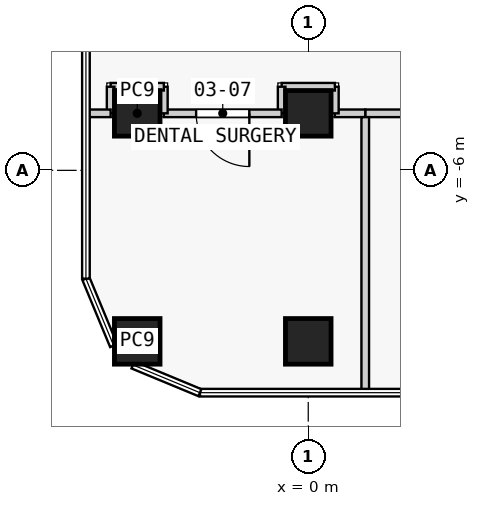
"""IFC4 building model, lengths in metres.
Left out: names, types, materials, properties, quantities, classifications, styles, units other than length and angle.
Written with IfcOpenShell. Run it as: python <this file> out.ifc"""

import sys

from ifc_helpers import new_model, si_unit, direction, frame, frame_2d, origin, origin_2d, place, context, subcontext, project, spatial, rectangle, extrude, element, fill, save


model = new_model("IFC4")
c1 = context("Model", 3, precision=1e-05, world=origin(), true_north=direction((0.0, 1.0)))
c2 = subcontext(c1, "Body", "Model", "MODEL_VIEW")
j1 = project(units=[si_unit("LENGTHUNIT", "METRE"), si_unit("PLANEANGLEUNIT", "RADIAN")], contexts=[c1])
p1 = place(None, origin())
s1 = spatial("IfcSite", under=j1, at=p1, CompositionType="ELEMENT")
p2 = place(p1, origin())
s2 = spatial("IfcBuilding", under=s1, at=p2, CompositionType="ELEMENT")
p3 = place(p2, frame((0.0, 0.0, 17.3)))
s3 = spatial("IfcBuildingStorey", under=s2, at=p3, CompositionType="ELEMENT", Elevation=17.3)
for number, where, z_axis, x_axis in (
    (1, (-4.5, -10.5, 0.0), (0.0, 0.0, 1.0), (1.0, 0.0, 0.0)),
    (2, (-4.5, -4.5, 0.0), (0.0, 0.0, 1.0), (1.0, 0.0, 0.0)),
    (3, (0.0, -10.5, 0.0), (0.0, 0.0, 1.0), (1.0, 0.0, 0.0)),
    (4, (0.0, -4.5, 0.0), (0.0, 0.0, 1.0), (1.0, 0.0, 0.0)),
):
    element("IfcColumn", number, at=place(p3, frame(where, z_axis=z_axis, x_axis=x_axis)), inside=s3, PredefinedType="COLUMN", context=c2, shape_type="SweptSolid", body=[
        extrude(rectangle(XDim=1.2, YDim=1.2, at=origin_2d()), origin(), (0.0, 0.0, 1.0), 4.5),
    ])
p4 = place(p3, frame((8.3, -4.5, 0.0), z_axis=(0.0, 0.0, 1.0), x_axis=(-1.0, 0.0, 0.0)))
e5 = element("IfcWall", 5, at=p4, inside=s3, PredefinedType="PARTITIONING", context=c2, shape_type="SweptSolid", body=[
    extrude(rectangle(XDim=6.8, YDim=0.2, at=frame_2d((3.4, 0.0))), origin(), (0.0, 0.0, 1.0), 4.15),
])
p5 = place(p4, frame((2.6, 0.0, 0.0)))
e6 = element("IfcOpeningElement", 6, at=p5, cuts=e5, PredefinedType="OPENING", context=c2, shape_type="SweptSolid", body=[
    extrude(rectangle(XDim=1.4, YDim=2.1, at=frame_2d((0.7, 1.05))), frame((0.0, 0.11, 0.0), z_axis=(0.0, -1.0, 0.0), x_axis=(1.0, 0.0, 0.0)), (0.0, 0.0, 1.0), 0.22),
])
p6 = place(p3, frame((1.5, -4.5, 0.0), z_axis=(0.0, 0.0, 1.0), x_axis=(-1.0, 0.0, 0.0)))
e7 = element("IfcWall", 7, at=p6, inside=s3, PredefinedType="PARTITIONING", context=c2, shape_type="SweptSolid", body=[
    extrude(rectangle(XDim=0.8, YDim=0.2, at=frame_2d((0.4, 0.0))), origin(), (0.0, 0.0, 1.0), 4.15),
])
p7 = place(p3, frame((0.7, -4.5, 0.0), z_axis=(0.0, 0.0, 1.0), x_axis=(0.0, 1.0, 0.0)))
e8 = element("IfcWall", 8, at=p7, inside=s3, PredefinedType="PARTITIONING", context=c2, shape_type="SweptSolid", body=[
    extrude(rectangle(XDim=0.7, YDim=0.2, at=frame_2d((0.35, 0.0))), origin(), (0.0, 0.0, 1.0), 4.15),
])
p8 = place(p3, frame((0.7, -3.8, 0.0), z_axis=(0.0, 0.0, 1.0), x_axis=(-1.0, 0.0, 0.0)))
e9 = element("IfcWall", 9, at=p8, inside=s3, PredefinedType="PARTITIONING", context=c2, shape_type="SweptSolid", body=[
    extrude(rectangle(XDim=1.4, YDim=0.2, at=frame_2d((0.7, 0.0))), origin(), (0.0, 0.0, 1.0), 4.15),
])
p9 = place(p3, frame((-0.7, -3.8, 0.0), z_axis=(0.0, 0.0, 1.0), x_axis=(0.0, -1.0, 0.0)))
e10 = element("IfcWall", 10, at=p9, inside=s3, PredefinedType="PARTITIONING", context=c2, shape_type="SweptSolid", body=[
    extrude(rectangle(XDim=0.7, YDim=0.2, at=frame_2d((0.35, 0.0))), origin(), (0.0, 0.0, 1.0), 4.15),
])
p10 = place(p3, frame((-0.7, -4.5, 0.0), z_axis=(0.0, 0.0, 1.0), x_axis=(-1.0, 0.0, 0.0)))
e11 = element("IfcWall", 11, at=p10, inside=s3, PredefinedType="PARTITIONING", context=c2, shape_type="SweptSolid", body=[
    extrude(rectangle(XDim=3.1, YDim=0.2, at=frame_2d((1.55, 0.0))), origin(), (0.0, 0.0, 1.0), 4.15),
])
p11 = place(p10, frame((0.85, 0.0, 0.0)))
e12 = element("IfcOpeningElement", 12, at=p11, cuts=e11, PredefinedType="OPENING", context=c2, shape_type="SweptSolid", body=[
    extrude(rectangle(XDim=1.4, YDim=2.1, at=frame_2d((0.7, 1.05))), frame((0.0, 0.11, 0.0), z_axis=(0.0, -1.0, 0.0), x_axis=(1.0, 0.0, 0.0)), (0.0, 0.0, 1.0), 0.22),
])
p12 = place(p3, frame((-3.8, -4.5, 0.0), z_axis=(0.0, 0.0, 1.0), x_axis=(0.0, 1.0, 0.0)))
e13 = element("IfcWall", 13, at=p12, inside=s3, PredefinedType="PARTITIONING", context=c2, shape_type="SweptSolid", body=[
    extrude(rectangle(XDim=0.7, YDim=0.2, at=frame_2d((0.35, 0.0))), origin(), (0.0, 0.0, 1.0), 4.15),
])
p13 = place(p3, frame((1.5, -4.6, 0.0), z_axis=(0.0, 0.0, 1.0), x_axis=(0.0, -1.0, 0.0)))
e14 = element("IfcWall", 14, at=p13, inside=s3, PredefinedType="PARTITIONING", context=c2, shape_type="SweptSolid", body=[
    extrude(rectangle(XDim=7.25, YDim=0.2, at=frame_2d((3.625, 0.0))), origin(), (0.0, 0.0, 1.0), 4.15),
])
p14 = place(p3, frame((-3.8, -3.8, 0.0), z_axis=(0.0, 0.0, 1.0), x_axis=(-1.0, 0.0, 0.0)))
e15 = element("IfcWall", 15, at=p14, inside=s3, PredefinedType="PARTITIONING", context=c2, shape_type="SweptSolid", body=[
    extrude(rectangle(XDim=1.4, YDim=0.2, at=frame_2d((0.7, 0.0))), origin(), (0.0, 0.0, 1.0), 4.15),
])
p15 = place(p3, frame((-5.2, -3.8, 0.0), z_axis=(0.0, 0.0, 1.0), x_axis=(0.0, -1.0, 0.0)))
e16 = element("IfcWall", 16, at=p15, inside=s3, PredefinedType="PARTITIONING", context=c2, shape_type="SweptSolid", body=[
    extrude(rectangle(XDim=0.7, YDim=0.2, at=frame_2d((0.35, 0.0))), origin(), (0.0, 0.0, 1.0), 4.15),
])
p16 = place(p3, frame((-5.2, -4.5, 0.0), z_axis=(0.0, 0.0, 1.0), x_axis=(-1.0, 0.0, 0.0)))
e17 = element("IfcWall", 17, at=p16, inside=s3, PredefinedType="PARTITIONING", context=c2, shape_type="SweptSolid", body=[
    extrude(rectangle(XDim=0.65, YDim=0.2, at=frame_2d((0.325, 0.0))), origin(), (0.0, 0.0, 1.0), 4.15),
])
p17 = place(p11, origin())
e18 = element("IfcDoor", 18, at=p17, inside=s3, OperationType="SINGLE_SWING_LEFT", PredefinedType="DOOR", context=c2, shape_type="SweptSolid", body=[
    extrude(rectangle(XDim=1.4, YDim=2.1, at=frame_2d((0.7, 1.05))), frame((0.0, 0.025, 0.0), z_axis=(0.0, -1.0, 0.0), x_axis=(1.0, 0.0, 0.0)), (0.0, 0.0, 1.0), 0.05),
])
fill(e12, e18)
save(model, sys.argv[1])
